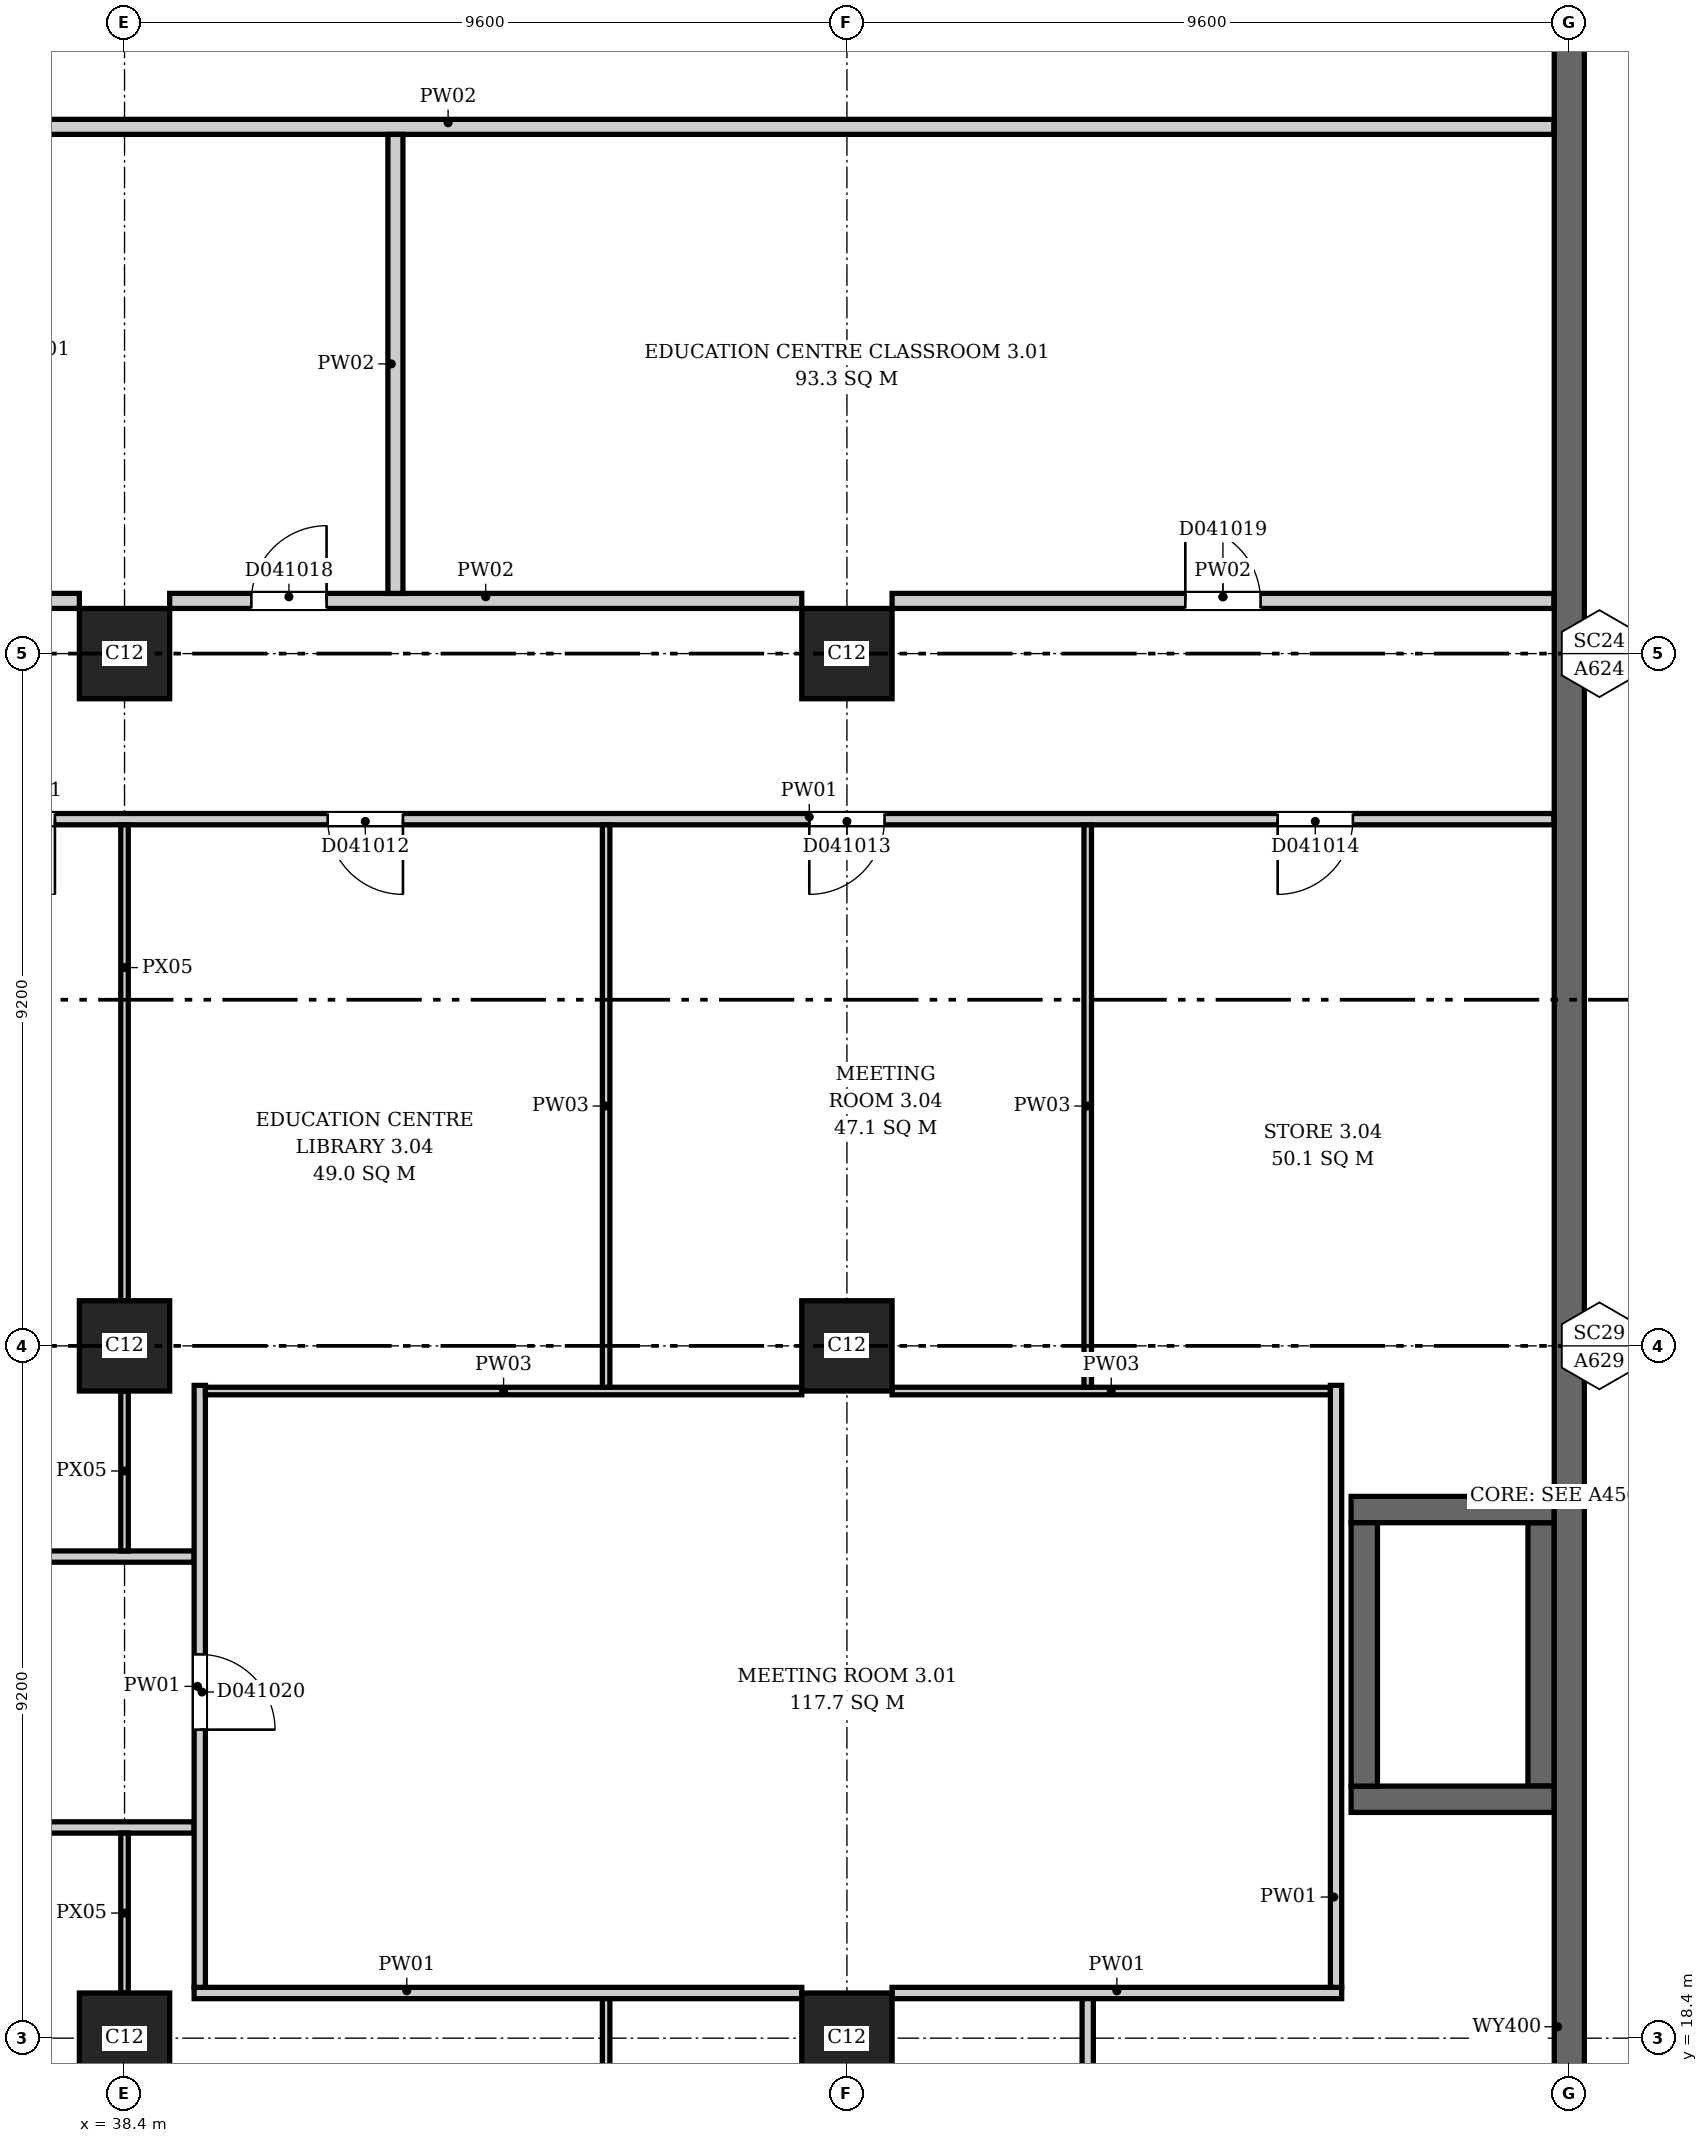
"""IFC4 building model, lengths in metres.
Left out: names, types, materials, properties, quantities, classifications, styles, units other than length and angle.
Written with IfcOpenShell. Run it as: python <this file> out.ifc"""

import sys

from ifc_helpers import new_model, si_unit, direction, frame, frame_2d, origin, origin_2d, place, context, subcontext, project, spatial, rectangle, extrude, element, fill, save


model = new_model("IFC4")
c1 = context("Model", 3, precision=1e-05, world=origin(), true_north=direction((0.0, 1.0)))
c2 = subcontext(c1, "Body", "Model", "MODEL_VIEW")
j1 = project(units=[si_unit("LENGTHUNIT", "METRE"), si_unit("PLANEANGLEUNIT", "RADIAN")], contexts=[c1])
p1 = place(None, origin())
s1 = spatial("IfcSite", under=j1, at=p1, CompositionType="ELEMENT")
p2 = place(p1, origin())
s2 = spatial("IfcBuilding", under=s1, at=p2, CompositionType="ELEMENT")
p3 = place(p2, frame((0.0, 0.0, 21.7)))
s3 = spatial("IfcBuildingStorey", under=s2, at=p3, CompositionType="ELEMENT", Elevation=21.7)
p4 = place(p3, frame((57.6, -0.2, 0.0), z_axis=(0.0, 0.0, 1.0), x_axis=(0.0, 1.0, 0.0)))
e1 = element("IfcWall", 1, at=p4, inside=s3, PredefinedType="SHEAR", context=c2, shape_type="SweptSolid", body=[
    extrude(rectangle(XDim=46.88, YDim=0.4, at=frame_2d((23.44, 0.0))), origin(), (0.0, 0.0, 1.0), 5.0),
])
for number, where, z_axis, x_axis in (
    (2, (54.7, 21.575, 0.0), (0.0, 0.0, 1.0), (1.0, 0.0, 0.0)),
    (3, (54.7, 25.425, 0.0), (0.0, 0.0, 1.0), (1.0, 0.0, 0.0)),
):
    element("IfcWall", number, at=place(p3, frame(where, z_axis=z_axis, x_axis=x_axis)), inside=s3, PredefinedType="SHEAR", context=c2, shape_type="SweptSolid", body=[
        extrude(rectangle(XDim=2.7, YDim=0.35, at=frame_2d((1.35, 0.0))), origin(), (0.0, 0.0, 1.0), 5.0),
    ])
for number, where, z_axis, x_axis in (
    (4, (54.875, 21.75, 0.0), (0.0, 0.0, 1.0), (0.0, 1.0, 0.0)),
    (5, (57.225, 21.75, 0.0), (0.0, 0.0, 1.0), (0.0, 1.0, 0.0)),
):
    element("IfcWall", number, at=place(p3, frame(where, z_axis=z_axis, x_axis=x_axis)), inside=s3, PredefinedType="SHEAR", context=c2, shape_type="SweptSolid", body=[
        extrude(rectangle(XDim=3.5, YDim=0.35, at=frame_2d((1.75, 0.0))), origin(), (0.0, 0.0, 1.0), 5.0),
    ])
for number, where, z_axis, x_axis in (
    (6, (38.4, 18.4, 0.0), (0.0, 0.0, 1.0), (1.0, 0.0, 0.0)),
    (7, (48.0, 18.4, 0.0), (0.0, 0.0, 1.0), (1.0, 0.0, 0.0)),
    (8, (38.4, 27.6, 0.0), (0.0, 0.0, 1.0), (1.0, 0.0, 0.0)),
    (9, (48.0, 27.6, 0.0), (0.0, 0.0, 1.0), (1.0, 0.0, 0.0)),
    (10, (38.4, 36.8, 0.0), (0.0, 0.0, 1.0), (1.0, 0.0, 0.0)),
    (11, (48.0, 36.8, 0.0), (0.0, 0.0, 1.0), (1.0, 0.0, 0.0)),
):
    element("IfcColumn", number, at=place(p3, frame(where, z_axis=z_axis, x_axis=x_axis)), inside=s3, PredefinedType="COLUMN", context=c2, shape_type="SweptSolid", body=[
        extrude(rectangle(XDim=1.2, YDim=1.2, at=origin_2d()), origin(), (0.0, 0.0, 1.0), 5.0),
    ])
p5 = place(p3, frame((0.206, 24.8, 0.0), z_axis=(0.0, 0.0, 1.0), x_axis=(1.0, 0.0, 0.0)))
e12 = element("IfcWall", 12, at=p5, inside=s3, PredefinedType="PARTITIONING", context=c2, shape_type="SweptSolid", body=[
    extrude(rectangle(XDim=39.119, YDim=0.15, at=frame_2d((19.56, 0.0))), origin(), (0.0, 0.0, 1.0), 4.65),
])
p6 = place(p5, frame((15.294, 0.0, 0.0)))
e13 = element("IfcOpeningElement", 13, at=p6, cuts=e12, PredefinedType="OPENING", context=c2, shape_type="SweptSolid", body=[
    extrude(rectangle(XDim=1.0, YDim=2.1, at=frame_2d((0.5, 1.05))), frame((0.0, 0.085, 0.0), z_axis=(0.0, -1.0, 0.0), x_axis=(1.0, 0.0, 0.0)), (0.0, 0.0, 1.0), 0.17),
])
p7 = place(p5, frame((21.694, 0.0, 0.0)))
e14 = element("IfcOpeningElement", 14, at=p7, cuts=e12, PredefinedType="OPENING", context=c2, shape_type="SweptSolid", body=[
    extrude(rectangle(XDim=1.0, YDim=2.1, at=frame_2d((0.5, 1.05))), frame((0.0, 0.085, 0.0), z_axis=(0.0, -1.0, 0.0), x_axis=(1.0, 0.0, 0.0)), (0.0, 0.0, 1.0), 0.17),
])
p8 = place(p5, frame((28.094, 0.0, 0.0)))
e15 = element("IfcOpeningElement", 15, at=p8, cuts=e12, PredefinedType="OPENING", context=c2, shape_type="SweptSolid", body=[
    extrude(rectangle(XDim=1.0, YDim=2.1, at=frame_2d((0.5, 1.05))), frame((0.0, 0.085, 0.0), z_axis=(0.0, -1.0, 0.0), x_axis=(1.0, 0.0, 0.0)), (0.0, 0.0, 1.0), 0.17),
])
p9 = place(p3, frame((28.006, 43.8, 0.0), z_axis=(0.0, 0.0, 1.0), x_axis=(1.0, 0.0, 0.0)))
e16 = element("IfcWall", 16, at=p9, inside=s3, PredefinedType="PARTITIONING", context=c2, shape_type="SweptSolid", body=[
    extrude(rectangle(XDim=29.388, YDim=0.2, at=frame_2d((14.694, 0.0))), origin(), (0.0, 0.0, 1.0), 4.65),
])
p10 = place(p3, frame((29.075, 21.2, 0.0), z_axis=(0.0, 0.0, 1.0), x_axis=(1.0, 0.0, 0.0)))
e17 = element("IfcWall", 17, at=p10, inside=s3, PredefinedType="PARTITIONING", context=c2, shape_type="SweptSolid", body=[
    extrude(rectangle(XDim=10.25, YDim=0.15, at=frame_2d((5.125, 0.0))), origin(), (0.0, 0.0, 1.0), 4.65),
])
p11 = place(p10, frame((1.035, 0.0, 0.0)))
e18 = element("IfcOpeningElement", 18, at=p11, cuts=e17, PredefinedType="OPENING", context=c2, shape_type="SweptSolid", body=[
    extrude(rectangle(XDim=1.0, YDim=2.1, at=frame_2d((0.5, 1.05))), frame((0.0, 0.085, 0.0), z_axis=(0.0, -1.0, 0.0), x_axis=(1.0, 0.0, 0.0)), (0.0, 0.0, 1.0), 0.17),
])
p12 = place(p10, frame((5.625, 0.0, 0.0)))
e19 = element("IfcOpeningElement", 19, at=p12, cuts=e17, PredefinedType="OPENING", context=c2, shape_type="SweptSolid", body=[
    extrude(rectangle(XDim=1.0, YDim=2.1, at=frame_2d((0.5, 1.05))), frame((0.0, 0.085, 0.0), z_axis=(0.0, -1.0, 0.0), x_axis=(1.0, 0.0, 0.0)), (0.0, 0.0, 1.0), 0.17),
])
p13 = place(p3, frame((29.9, 37.5, 0.0), z_axis=(0.0, 0.0, 1.0), x_axis=(1.0, 0.0, 0.0)))
e20 = element("IfcWall", 20, at=p13, inside=s3, PredefinedType="PARTITIONING", context=c2, shape_type="SweptSolid", body=[
    extrude(rectangle(XDim=7.9, YDim=0.2, at=frame_2d((3.95, 0.0))), origin(), (0.0, 0.0, 1.0), 4.65),
])
p14 = place(p3, frame((35.406, 34.6, 0.0), z_axis=(0.0, 0.0, 1.0), x_axis=(1.0, 0.0, 0.0)))
e21 = element("IfcWall", 21, at=p14, inside=s3, PredefinedType="PARTITIONING", context=c2, shape_type="SweptSolid", body=[
    extrude(rectangle(XDim=21.988, YDim=0.15, at=frame_2d((10.994, 0.0))), origin(), (0.0, 0.0, 1.0), 4.65),
])
p15 = place(p14, frame((1.069, 0.0, 0.0)))
e22 = element("IfcOpeningElement", 22, at=p15, cuts=e21, PredefinedType="OPENING", context=c2, shape_type="SweptSolid", body=[
    extrude(rectangle(XDim=1.0, YDim=2.1, at=frame_2d((0.5, 1.05))), frame((0.0, 0.085, 0.0), z_axis=(0.0, -1.0, 0.0), x_axis=(1.0, 0.0, 0.0)), (0.0, 0.0, 1.0), 0.17),
])
p16 = place(p14, frame((5.694, 0.0, 0.0)))
e23 = element("IfcOpeningElement", 23, at=p16, cuts=e21, PredefinedType="OPENING", context=c2, shape_type="SweptSolid", body=[
    extrude(rectangle(XDim=1.0, YDim=2.1, at=frame_2d((0.5, 1.05))), frame((0.0, 0.085, 0.0), z_axis=(0.0, -1.0, 0.0), x_axis=(1.0, 0.0, 0.0)), (0.0, 0.0, 1.0), 0.17),
])
p17 = place(p14, frame((12.094, 0.0, 0.0)))
e24 = element("IfcOpeningElement", 24, at=p17, cuts=e21, PredefinedType="OPENING", context=c2, shape_type="SweptSolid", body=[
    extrude(rectangle(XDim=1.0, YDim=2.1, at=frame_2d((0.5, 1.05))), frame((0.0, 0.085, 0.0), z_axis=(0.0, -1.0, 0.0), x_axis=(1.0, 0.0, 0.0)), (0.0, 0.0, 1.0), 0.17),
])
p18 = place(p14, frame((18.318, 0.0, 0.0)))
e25 = element("IfcOpeningElement", 25, at=p18, cuts=e21, PredefinedType="OPENING", context=c2, shape_type="SweptSolid", body=[
    extrude(rectangle(XDim=1.0, YDim=2.1, at=frame_2d((0.5, 1.05))), frame((0.0, 0.085, 0.0), z_axis=(0.0, -1.0, 0.0), x_axis=(1.0, 0.0, 0.0)), (0.0, 0.0, 1.0), 0.17),
])
for number, where, z_axis, x_axis in (
    (26, (38.4, 19.0, 0.0), (0.0, 0.0, 1.0), (0.0, 1.0, 0.0)),
    (27, (38.4, 24.875, 0.0), (0.0, 0.0, 1.0), (0.0, 1.0, 0.0)),
):
    element("IfcWall", number, at=place(p3, frame(where, z_axis=z_axis, x_axis=x_axis)), inside=s3, PredefinedType="PARTITIONING", context=c2, shape_type="SweptSolid", body=[
        extrude(rectangle(XDim=2.125, YDim=0.1, at=frame_2d((1.062, 0.0))), origin(), (0.0, 0.0, 1.0), 4.25),
    ])
p19 = place(p3, frame((38.4, 28.2, 0.0), z_axis=(0.0, 0.0, 1.0), x_axis=(0.0, 1.0, 0.0)))
e28 = element("IfcWall", 28, at=p19, inside=s3, PredefinedType="PARTITIONING", context=c2, shape_type="SweptSolid", body=[
    extrude(rectangle(XDim=6.325, YDim=0.1, at=frame_2d((3.163, 0.0))), origin(), (0.0, 0.0, 1.0), 4.25),
])
p20 = place(p3, frame((39.0, 37.5, 0.0), z_axis=(0.0, 0.0, 1.0), x_axis=(1.0, 0.0, 0.0)))
e29 = element("IfcWall", 29, at=p20, inside=s3, PredefinedType="PARTITIONING", context=c2, shape_type="SweptSolid", body=[
    extrude(rectangle(XDim=8.4, YDim=0.2, at=frame_2d((4.2, 0.0))), origin(), (0.0, 0.0, 1.0), 4.65),
])
p21 = place(p20, frame((1.085, 0.0, 0.0)))
e30 = element("IfcOpeningElement", 30, at=p21, cuts=e29, PredefinedType="OPENING", context=c2, shape_type="SweptSolid", body=[
    extrude(rectangle(XDim=1.0, YDim=2.1, at=frame_2d((0.5, 1.05))), frame((0.0, 0.11, 0.0), z_axis=(0.0, -1.0, 0.0), x_axis=(1.0, 0.0, 0.0)), (0.0, 0.0, 1.0), 0.22),
])
p22 = place(p3, frame((39.325, 19.0, 0.0), z_axis=(0.0, 0.0, 1.0), x_axis=(1.0, 0.0, 0.0)))
e31 = element("IfcWall", 31, at=p22, inside=s3, PredefinedType="PARTITIONING", context=c2, shape_type="SweptSolid", body=[
    extrude(rectangle(XDim=8.075, YDim=0.15, at=frame_2d((4.038, 0.0))), origin(), (0.0, 0.0, 1.0), 4.65),
])
p23 = place(p3, frame((39.4, 19.075, 0.0), z_axis=(0.0, 0.0, 1.0), x_axis=(0.0, 1.0, 0.0)))
e32 = element("IfcWall", 32, at=p23, inside=s3, PredefinedType="PARTITIONING", context=c2, shape_type="SweptSolid", body=[
    extrude(rectangle(XDim=8.0, YDim=0.15, at=frame_2d((4.0, 0.0))), origin(), (0.0, 0.0, 1.0), 4.65),
])
p24 = place(p23, frame((3.425, 0.0, 0.0)))
e33 = element("IfcOpeningElement", 33, at=p24, cuts=e32, PredefinedType="OPENING", context=c2, shape_type="SweptSolid", body=[
    extrude(rectangle(XDim=1.0, YDim=2.1, at=frame_2d((0.5, 1.05))), frame((0.0, 0.085, 0.0), z_axis=(0.0, -1.0, 0.0), x_axis=(1.0, 0.0, 0.0)), (0.0, 0.0, 1.0), 0.17),
])
p25 = place(p3, frame((39.475, 27.0, 0.0), z_axis=(0.0, 0.0, 1.0), x_axis=(1.0, 0.0, 0.0)))
e34 = element("IfcWall", 34, at=p25, inside=s3, PredefinedType="PARTITIONING", context=c2, shape_type="SweptSolid", body=[
    extrude(rectangle(XDim=7.925, YDim=0.1, at=frame_2d((3.962, 0.0))), origin(), (0.0, 0.0, 1.0), 4.65),
])
p26 = place(p3, frame((42.0, 37.6, 0.0), z_axis=(0.0, 0.0, 1.0), x_axis=(0.0, 1.0, 0.0)))
e35 = element("IfcWall", 35, at=p26, inside=s3, PredefinedType="PARTITIONING", context=c2, shape_type="SweptSolid", body=[
    extrude(rectangle(XDim=6.1, YDim=0.2, at=frame_2d((3.05, 0.0))), origin(), (0.0, 0.0, 1.0), 4.65),
])
p27 = place(p3, frame((44.8, 11.575, 0.0), z_axis=(0.0, 0.0, 1.0), x_axis=(0.0, 1.0, 0.0)))
e36 = element("IfcWall", 36, at=p27, inside=s3, PredefinedType="PARTITIONING", context=c2, shape_type="SweptSolid", body=[
    extrude(rectangle(XDim=7.35, YDim=0.1, at=frame_2d((3.675, 0.0))), origin(), (0.0, 0.0, 1.0), 4.65),
])
p28 = place(p3, frame((44.8, 27.05, 0.0), z_axis=(0.0, 0.0, 1.0), x_axis=(0.0, 1.0, 0.0)))
e37 = element("IfcWall", 37, at=p28, inside=s3, PredefinedType="PARTITIONING", context=c2, shape_type="SweptSolid", body=[
    extrude(rectangle(XDim=7.475, YDim=0.1, at=frame_2d((3.737, 0.0))), origin(), (0.0, 0.0, 1.0), 4.65),
])
p29 = place(p3, frame((48.6, 19.0, 0.0), z_axis=(0.0, 0.0, 1.0), x_axis=(1.0, 0.0, 0.0)))
e38 = element("IfcWall", 38, at=p29, inside=s3, PredefinedType="PARTITIONING", context=c2, shape_type="SweptSolid", body=[
    extrude(rectangle(XDim=5.975, YDim=0.15, at=frame_2d((2.987, 0.0))), origin(), (0.0, 0.0, 1.0), 4.65),
])
p30 = place(p3, frame((48.6, 27.0, 0.0), z_axis=(0.0, 0.0, 1.0), x_axis=(1.0, 0.0, 0.0)))
e39 = element("IfcWall", 39, at=p30, inside=s3, PredefinedType="PARTITIONING", context=c2, shape_type="SweptSolid", body=[
    extrude(rectangle(XDim=5.825, YDim=0.1, at=frame_2d((2.913, 0.0))), origin(), (0.0, 0.0, 1.0), 4.65),
])
p31 = place(p3, frame((48.6, 37.5, 0.0), z_axis=(0.0, 0.0, 1.0), x_axis=(1.0, 0.0, 0.0)))
e40 = element("IfcWall", 40, at=p31, inside=s3, PredefinedType="PARTITIONING", context=c2, shape_type="SweptSolid", body=[
    extrude(rectangle(XDim=8.794, YDim=0.2, at=frame_2d((4.397, 0.0))), origin(), (0.0, 0.0, 1.0), 4.65),
])
p32 = place(p31, frame((3.897, 0.0, 0.0)))
e41 = element("IfcOpeningElement", 41, at=p32, cuts=e40, PredefinedType="OPENING", context=c2, shape_type="SweptSolid", body=[
    extrude(rectangle(XDim=1.0, YDim=2.1, at=frame_2d((0.5, 1.05))), frame((0.0, 0.11, 0.0), z_axis=(0.0, -1.0, 0.0), x_axis=(1.0, 0.0, 0.0)), (0.0, 0.0, 1.0), 0.22),
])
p33 = place(p3, frame((51.2, 11.575, 0.0), z_axis=(0.0, 0.0, 1.0), x_axis=(0.0, 1.0, 0.0)))
e42 = element("IfcWall", 42, at=p33, inside=s3, PredefinedType="PARTITIONING", context=c2, shape_type="SweptSolid", body=[
    extrude(rectangle(XDim=7.35, YDim=0.15, at=frame_2d((3.675, 0.0))), origin(), (0.0, 0.0, 1.0), 4.65),
])
p34 = place(p3, frame((51.2, 27.05, 0.0), z_axis=(0.0, 0.0, 1.0), x_axis=(0.0, 1.0, 0.0)))
e43 = element("IfcWall", 43, at=p34, inside=s3, PredefinedType="PARTITIONING", context=c2, shape_type="SweptSolid", body=[
    extrude(rectangle(XDim=7.475, YDim=0.1, at=frame_2d((3.737, 0.0))), origin(), (0.0, 0.0, 1.0), 4.65),
])
p35 = place(p3, frame((54.5, 19.075, 0.0), z_axis=(0.0, 0.0, 1.0), x_axis=(0.0, 1.0, 0.0)))
e44 = element("IfcWall", 44, at=p35, inside=s3, PredefinedType="PARTITIONING", context=c2, shape_type="SweptSolid", body=[
    extrude(rectangle(XDim=8.0, YDim=0.15, at=frame_2d((4.0, 0.0))), origin(), (0.0, 0.0, 1.0), 4.65),
])
p36 = place(p15, origin())
e45 = element("IfcDoor", 45, at=p36, inside=s3, OperationType="SINGLE_SWING_RIGHT", PredefinedType="DOOR", context=c2, shape_type="SweptSolid", body=[
    extrude(rectangle(XDim=1.0, YDim=2.1, at=frame_2d((0.5, 1.05))), frame((0.0, 0.025, 0.0), z_axis=(0.0, -1.0, 0.0), x_axis=(1.0, 0.0, 0.0)), (0.0, 0.0, 1.0), 0.05),
])
fill(e22, e45)
p37 = place(p16, origin())
e46 = element("IfcDoor", 46, at=p37, inside=s3, OperationType="SINGLE_SWING_RIGHT", PredefinedType="DOOR", context=c2, shape_type="SweptSolid", body=[
    extrude(rectangle(XDim=1.0, YDim=2.1, at=frame_2d((0.5, 1.05))), frame((0.0, 0.025, 0.0), z_axis=(0.0, -1.0, 0.0), x_axis=(1.0, 0.0, 0.0)), (0.0, 0.0, 1.0), 0.05),
])
fill(e23, e46)
p38 = place(p17, origin())
e47 = element("IfcDoor", 47, at=p38, inside=s3, OperationType="SINGLE_SWING_LEFT", PredefinedType="DOOR", context=c2, shape_type="SweptSolid", body=[
    extrude(rectangle(XDim=1.0, YDim=2.1, at=frame_2d((0.5, 1.05))), frame((0.0, 0.025, 0.0), z_axis=(0.0, -1.0, 0.0), x_axis=(1.0, 0.0, 0.0)), (0.0, 0.0, 1.0), 0.05),
])
fill(e24, e47)
p39 = place(p18, origin())
e48 = element("IfcDoor", 48, at=p39, inside=s3, OperationType="SINGLE_SWING_LEFT", PredefinedType="DOOR", context=c2, shape_type="SweptSolid", body=[
    extrude(rectangle(XDim=1.0, YDim=2.1, at=frame_2d((0.5, 1.05))), frame((0.0, 0.025, 0.0), z_axis=(0.0, -1.0, 0.0), x_axis=(1.0, 0.0, 0.0)), (0.0, 0.0, 1.0), 0.05),
])
fill(e25, e48)
p40 = place(p21, origin())
e49 = element("IfcDoor", 49, at=p40, inside=s3, OperationType="SINGLE_SWING_RIGHT", PredefinedType="DOOR", context=c2, shape_type="SweptSolid", body=[
    extrude(rectangle(XDim=1.0, YDim=2.1, at=frame_2d((0.5, 1.05))), frame((0.0, 0.025, 0.0), z_axis=(0.0, -1.0, 0.0), x_axis=(1.0, 0.0, 0.0)), (0.0, 0.0, 1.0), 0.05),
])
fill(e30, e49)
p41 = place(p32, origin())
e50 = element("IfcDoor", 50, at=p41, inside=s3, OperationType="SINGLE_SWING_LEFT", PredefinedType="DOOR", context=c2, shape_type="SweptSolid", body=[
    extrude(rectangle(XDim=1.0, YDim=2.1, at=frame_2d((0.5, 1.05))), frame((0.0, 0.025, 0.0), z_axis=(0.0, -1.0, 0.0), x_axis=(1.0, 0.0, 0.0)), (0.0, 0.0, 1.0), 0.05),
])
fill(e41, e50)
p42 = place(p24, origin())
e51 = element("IfcDoor", 51, at=p42, inside=s3, OperationType="SINGLE_SWING_LEFT", PredefinedType="DOOR", context=c2, shape_type="SweptSolid", body=[
    extrude(rectangle(XDim=1.0, YDim=2.1, at=frame_2d((0.5, 1.05))), frame((0.0, 0.025, 0.0), z_axis=(0.0, -1.0, 0.0), x_axis=(1.0, 0.0, 0.0)), (0.0, 0.0, 1.0), 0.05),
])
fill(e33, e51)
save(model, sys.argv[1])
